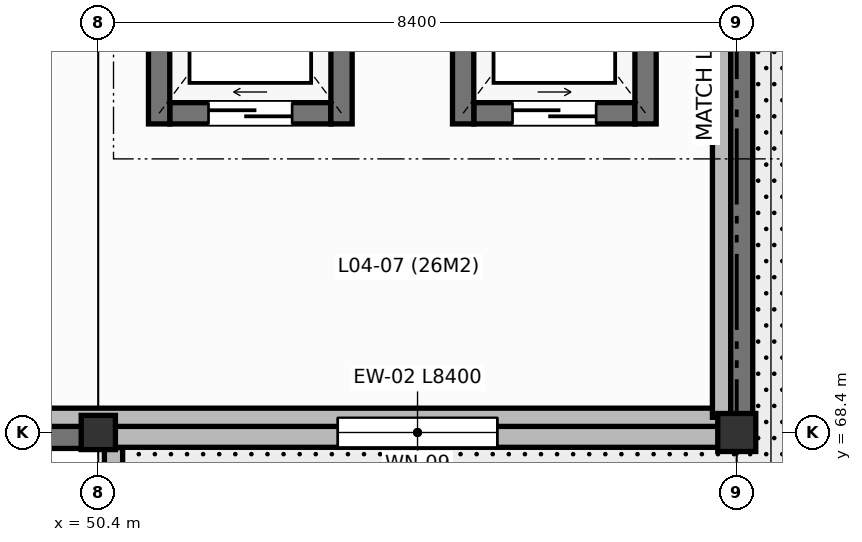
"""IFC4 building model, lengths in metres.
Left out: names, types, materials, properties, quantities, classifications, styles, units other than length and angle.
Written with IfcOpenShell. Run it as: python <this file> out.ifc"""

import sys

from ifc_helpers import new_model, si_unit, direction, frame, frame_2d, origin, origin_2d, place, context, subcontext, project, spatial, rectangle, extrude, element, fill, save


model = new_model("IFC4")
c1 = context("Model", 3, precision=1e-05, world=origin(), true_north=direction((0.0, 1.0)))
c2 = subcontext(c1, "Body", "Model", "MODEL_VIEW")
j1 = project(units=[si_unit("LENGTHUNIT", "METRE"), si_unit("PLANEANGLEUNIT", "RADIAN")], contexts=[c1])
p1 = place(None, origin())
s1 = spatial("IfcSite", under=j1, at=p1, CompositionType="ELEMENT")
p2 = place(p1, origin())
s2 = spatial("IfcBuilding", under=s1, at=p2, CompositionType="ELEMENT")
p3 = place(p2, frame((0.0, 0.0, 17.4)))
s3 = spatial("IfcBuildingStorey", under=s2, at=p3, CompositionType="ELEMENT", Elevation=17.4)
p4 = place(p3, frame((50.4, 68.4, 0.0), z_axis=(0.0, 0.0, 1.0), x_axis=(1.0, 0.0, 0.0)))
e1 = element("IfcColumn", 1, at=p4, inside=s3, PredefinedType="COLUMN", context=c2, shape_type="SweptSolid", body=[
    extrude(rectangle(XDim=0.45, YDim=0.45, at=origin_2d()), origin(), (0.0, 0.0, 1.0), 4.2),
])
p5 = place(p3, frame((58.8, 68.4, 0.0), z_axis=(0.0, 0.0, 1.0), x_axis=(1.0, 0.0, 0.0)))
e2 = element("IfcColumn", 2, at=p5, inside=s3, PredefinedType="COLUMN", context=c2, shape_type="SweptSolid", body=[
    extrude(rectangle(XDim=0.5, YDim=0.5, at=origin_2d()), origin(), (0.0, 0.0, 1.0), 4.2),
])
p6 = place(p3, frame((58.8, 76.8, 0.0), z_axis=(0.0, 0.0, 1.0), x_axis=(0.0, -1.0, 0.0)))
e3 = element("IfcWall", 3, at=p6, inside=s3, PredefinedType="STANDARD", context=c2, shape_type="SweptSolid", body=[
    extrude(rectangle(XDim=8.4, YDim=0.42, at=frame_2d((4.2, 0.0))), origin(), (0.0, 0.0, 1.0), 3.84),
])
p7 = place(p3, frame((58.8, 68.4, 0.0), z_axis=(0.0, 0.0, 1.0), x_axis=(-1.0, 0.0, 0.0)))
e4 = element("IfcWall", 4, at=p7, inside=s3, PredefinedType="STANDARD", context=c2, shape_type="SweptSolid", body=[
    extrude(rectangle(XDim=8.4, YDim=0.39, at=frame_2d((4.2, 0.0))), origin(), (0.0, 0.0, 1.0), 3.14),
])
p8 = place(p7, frame((3.15, 0.0, 0.8)))
e5 = element("IfcOpeningElement", 5, at=p8, cuts=e4, PredefinedType="OPENING", context=c2, shape_type="SweptSolid", body=[
    extrude(rectangle(XDim=2.1, YDim=1.45, at=frame_2d((1.05, 0.725))), frame((0.0, 0.205, 0.0), z_axis=(0.0, -1.0, 0.0), x_axis=(1.0, 0.0, 0.0)), (0.0, 0.0, 1.0), 0.41),
])
p9 = place(p3, frame((50.4, 68.4, 0.0), z_axis=(0.0, 0.0, 1.0), x_axis=(-1.0, 0.0, 0.0)))
e6 = element("IfcWall", 6, at=p9, inside=s3, PredefinedType="STANDARD", context=c2, shape_type="SweptSolid", body=[
    extrude(rectangle(XDim=7.2, YDim=0.42, at=frame_2d((3.6, 0.0))), origin(), (0.0, 0.0, 1.0), 3.84),
])
p10 = place(p9, frame((2.4, 0.0, 0.8)))
e7 = element("IfcOpeningElement", 7, at=p10, cuts=e6, PredefinedType="OPENING", context=c2, shape_type="SweptSolid", body=[
    extrude(rectangle(XDim=2.4, YDim=1.45, at=frame_2d((1.2, 0.725))), frame((0.0, 0.22, 0.0), z_axis=(0.0, -1.0, 0.0), x_axis=(1.0, 0.0, 0.0)), (0.0, 0.0, 1.0), 0.44),
])
p11 = place(p3, frame((50.6, 68.2, 0.0), z_axis=(0.0, 0.0, 1.0), x_axis=(0.0, -1.0, 0.0)))
e8 = element("IfcWall", 8, at=p11, inside=s3, PredefinedType="PARAPET", context=c2, shape_type="SweptSolid", body=[
    extrude(rectangle(XDim=24.8, YDim=0.24, at=frame_2d((12.4, 0.0))), origin(), (0.0, 0.0, 1.0), 1.15),
])
p12 = place(p3, frame((43.4, 68.6, 4.2), z_axis=(0.0, 0.0, 1.0), x_axis=(1.0, 0.0, 0.0)))
e9 = element("IfcWall", 9, at=p12, inside=s3, PredefinedType="PARAPET", context=c2, shape_type="SweptSolid", body=[
    extrude(rectangle(XDim=15.2, YDim=0.24, at=frame_2d((7.6, 0.0))), origin(), (0.0, 0.0, 1.0), 1.15),
])
p13 = place(p3, frame((58.6, 68.6, 4.2), z_axis=(0.0, 0.0, 1.0), x_axis=(0.0, 1.0, 0.0)))
e10 = element("IfcWall", 10, at=p13, inside=s3, PredefinedType="PARAPET", context=c2, shape_type="SweptSolid", body=[
    extrude(rectangle(XDim=14.4, YDim=0.24, at=frame_2d((7.2, 0.0))), origin(), (0.0, 0.0, 1.0), 1.15),
])
p14 = place(p3, frame((51.34, 72.6, 0.0), z_axis=(0.0, 0.0, 1.0), x_axis=(1.0, 0.0, 0.0)))
e11 = element("IfcWall", 11, at=p14, inside=s3, PredefinedType="SHEAR", context=c2, shape_type="SweptSolid", body=[
    extrude(rectangle(XDim=2.12, YDim=0.28, at=frame_2d((1.06, 0.0))), origin(), (0.0, 0.0, 1.0), 4.2),
])
p15 = place(p14, frame((0.51, 0.0, 0.0)))
e12 = element("IfcOpeningElement", 12, at=p15, cuts=e11, PredefinedType="OPENING", context=c2, shape_type="SweptSolid", body=[
    extrude(rectangle(XDim=1.1, YDim=2.15, at=frame_2d((0.55, 1.075))), frame((0.0, 0.15, 0.0), z_axis=(0.0, -1.0, 0.0), x_axis=(1.0, 0.0, 0.0)), (0.0, 0.0, 1.0), 0.3),
])
for number, where, z_axis, x_axis in (
    (13, (53.6, 72.46, 0.0), (0.0, 0.0, 1.0), (0.0, 1.0, 0.0)),
    (14, (51.2, 75.94, 0.0), (0.0, 0.0, 1.0), (0.0, -1.0, 0.0)),
):
    element("IfcWall", number, at=place(p3, frame(where, z_axis=z_axis, x_axis=x_axis)), inside=s3, PredefinedType="SHEAR", context=c2, shape_type="SweptSolid", body=[
        extrude(rectangle(XDim=3.48, YDim=0.28, at=frame_2d((1.74, 0.0))), origin(), (0.0, 0.0, 1.0), 4.2),
    ])
p16 = place(p3, frame((55.34, 72.6, 0.0), z_axis=(0.0, 0.0, 1.0), x_axis=(1.0, 0.0, 0.0)))
e15 = element("IfcWall", 15, at=p16, inside=s3, PredefinedType="SHEAR", context=c2, shape_type="SweptSolid", body=[
    extrude(rectangle(XDim=2.12, YDim=0.28, at=frame_2d((1.06, 0.0))), origin(), (0.0, 0.0, 1.0), 4.2),
])
p17 = place(p16, frame((0.51, 0.0, 0.0)))
e16 = element("IfcOpeningElement", 16, at=p17, cuts=e15, PredefinedType="OPENING", context=c2, shape_type="SweptSolid", body=[
    extrude(rectangle(XDim=1.1, YDim=2.15, at=frame_2d((0.55, 1.075))), frame((0.0, 0.15, 0.0), z_axis=(0.0, -1.0, 0.0), x_axis=(1.0, 0.0, 0.0)), (0.0, 0.0, 1.0), 0.3),
])
for number, where, z_axis, x_axis in (
    (17, (57.6, 72.46, 0.0), (0.0, 0.0, 1.0), (0.0, 1.0, 0.0)),
    (18, (55.2, 75.94, 0.0), (0.0, 0.0, 1.0), (0.0, -1.0, 0.0)),
):
    element("IfcWall", number, at=place(p3, frame(where, z_axis=z_axis, x_axis=x_axis)), inside=s3, PredefinedType="SHEAR", context=c2, shape_type="SweptSolid", body=[
        extrude(rectangle(XDim=3.48, YDim=0.28, at=frame_2d((1.74, 0.0))), origin(), (0.0, 0.0, 1.0), 4.2),
    ])
p18 = place(p8, origin())
e19 = element("IfcWindow", 19, at=p18, inside=s3, PartitioningType="SINGLE_PANEL", PredefinedType="WINDOW", context=c2, shape_type="SweptSolid", body=[
    extrude(rectangle(XDim=2.1, YDim=1.45, at=frame_2d((1.05, 0.725))), frame((0.0, 0.03, 0.0), z_axis=(0.0, -1.0, 0.0), x_axis=(1.0, 0.0, 0.0)), (0.0, 0.0, 1.0), 0.06),
])
fill(e5, e19)
p19 = place(p15, origin())
e20 = element("IfcDoor", 20, at=p19, inside=s3, OperationType="SLIDING_TO_LEFT", PredefinedType="DOOR", context=c2, shape_type="SweptSolid", body=[
    extrude(rectangle(XDim=1.1, YDim=2.15, at=frame_2d((0.55, 1.075))), frame((0.0, 0.025, 0.0), z_axis=(0.0, -1.0, 0.0), x_axis=(1.0, 0.0, 0.0)), (0.0, 0.0, 1.0), 0.05),
])
fill(e12, e20)
p20 = place(p17, origin())
e21 = element("IfcDoor", 21, at=p20, inside=s3, OperationType="SLIDING_TO_RIGHT", PredefinedType="DOOR", context=c2, shape_type="SweptSolid", body=[
    extrude(rectangle(XDim=1.1, YDim=2.15, at=frame_2d((0.55, 1.075))), frame((0.0, 0.025, 0.0), z_axis=(0.0, -1.0, 0.0), x_axis=(1.0, 0.0, 0.0)), (0.0, 0.0, 1.0), 0.05),
])
fill(e16, e21)
save(model, sys.argv[1])
